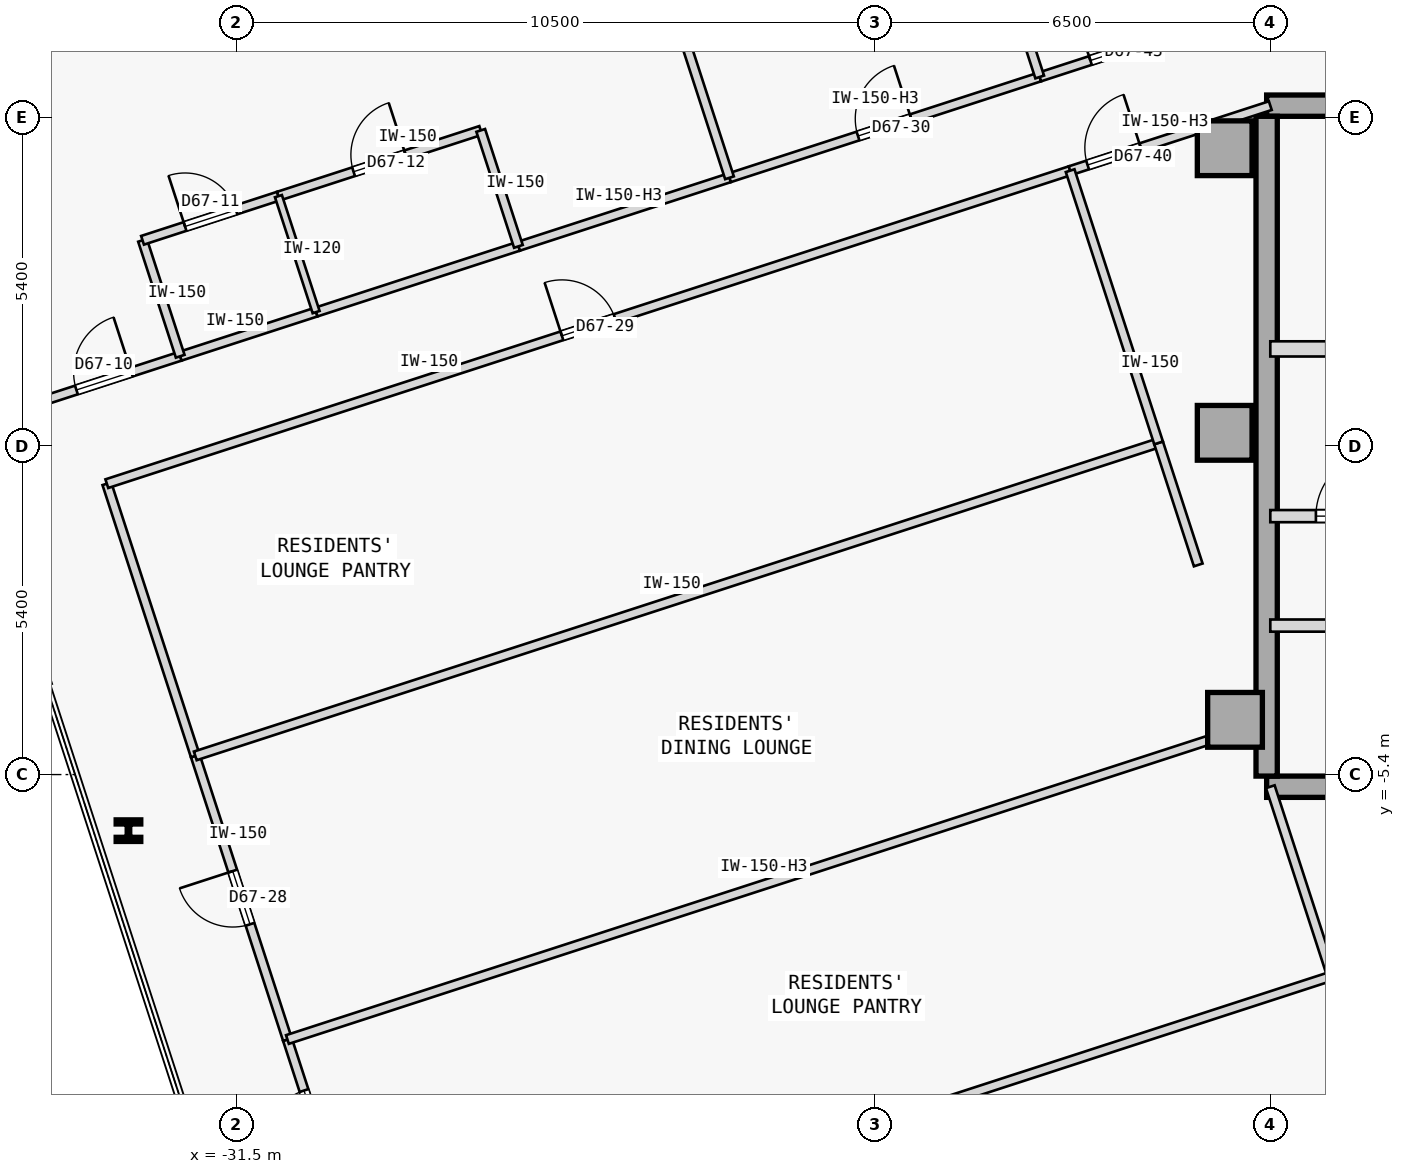
"""IFC4 building model, lengths in metres.
Left out: names, types, materials, properties, quantities, classifications, styles, units other than length and angle.
Written with IfcOpenShell. Run it as: python <this file> out.ifc"""

import sys

from ifc_helpers import new_model, si_unit, direction, frame, frame_2d, origin, origin_2d, place, context, subcontext, project, spatial, rectangle, i_section, extrude, element, fill, save


model = new_model("IFC4")
c1 = context("Model", 3, precision=1e-05, world=origin(), true_north=direction((0.0, 1.0)))
c2 = subcontext(c1, "Body", "Model", "MODEL_VIEW")
j1 = project(units=[si_unit("LENGTHUNIT", "METRE"), si_unit("PLANEANGLEUNIT", "RADIAN")], contexts=[c1])
p1 = place(None, origin())
s1 = spatial("IfcSite", under=j1, at=p1, CompositionType="ELEMENT")
p2 = place(p1, origin())
s2 = spatial("IfcBuilding", under=s1, at=p2, CompositionType="ELEMENT")
p3 = place(p2, frame((0.0, 0.0, 251.1)))
s3 = spatial("IfcBuildingStorey", under=s2, at=p3, CompositionType="ELEMENT", Elevation=251.1)
for number, where, z_axis, x_axis in (
    (1, (-15.25, 4.9, 0.0), (0.0, 0.0, 1.0), (1.0, 0.0, 0.0)),
    (2, (-15.25, 0.22, 0.0), (0.0, 0.0, 1.0), (1.0, 0.0, 0.0)),
    (3, (-15.08, -4.5, 0.0), (0.0, 0.0, 1.0), (1.0, 0.0, 0.0)),
):
    element("IfcColumn", number, at=place(p3, frame(where, z_axis=z_axis, x_axis=x_axis)), inside=s3, PredefinedType="COLUMN", context=c2, shape_type="SweptSolid", body=[
        extrude(rectangle(XDim=0.9, YDim=0.9, at=origin_2d()), origin(), (0.0, 0.0, 1.0), 3.35),
    ])
p4 = place(p3, frame((-14.56, 5.6, 0.0), z_axis=(0.0, 0.0, 1.0), x_axis=(1.0, 0.0, 0.0)))
e4 = element("IfcWall", 4, at=p4, inside=s3, PredefinedType="SHEAR", context=c2, shape_type="SweptSolid", body=[
    extrude(rectangle(XDim=11.41, YDim=0.35, at=frame_2d((5.705, 0.0))), origin(), (0.0, 0.0, 1.0), 2.95),
])
p5 = place(p3, frame((-14.56, -5.6, 0.0), z_axis=(0.0, 0.0, 1.0), x_axis=(1.0, 0.0, 0.0)))
e5 = element("IfcWall", 5, at=p5, inside=s3, PredefinedType="SHEAR", context=c2, shape_type="SweptSolid", body=[
    extrude(rectangle(XDim=10.86, YDim=0.35, at=frame_2d((5.43, 0.0))), origin(), (0.0, 0.0, 1.0), 2.95),
])
p6 = place(p3, frame((-14.56, -5.425, 0.0), z_axis=(0.0, 0.0, 1.0), x_axis=(0.0, 1.0, 0.0)))
e6 = element("IfcWall", 6, at=p6, inside=s3, PredefinedType="SHEAR", context=c2, shape_type="SweptSolid", body=[
    extrude(rectangle(XDim=10.85, YDim=0.35, at=frame_2d((5.425, 0.0))), origin(), (0.0, 0.0, 1.0), 2.95),
])
p7 = place(p3, frame((-33.278, -6.322, 0.0), z_axis=(0.0, 0.0, 1.0), x_axis=(1.0, 0.0, 0.0)))
e7 = element("IfcColumn", 7, at=p7, inside=s3, PredefinedType="COLUMN", context=c2, shape_type="SweptSolid", body=[
    extrude(i_section(OverallWidth=0.405, OverallDepth=0.355, WebThickness=0.042, FlangeThickness=0.068, FilletRadius=0.015, at=origin_2d()), origin(), (0.0, 0.0, 1.0), 3.35),
])
p8 = place(p3, frame((-14.5, 1.6, 0.0), z_axis=(0.0, 0.0, 1.0), x_axis=(1.0, 0.0, 0.0)))
e8 = element("IfcWall", 8, at=p8, inside=s3, PredefinedType="STANDARD", context=c2, shape_type="SweptSolid", body=[
    extrude(rectangle(XDim=3.6, YDim=0.25, at=frame_2d((1.8, 0.0))), origin(), (0.0, 0.0, 1.0), 2.95),
])
p9 = place(p8, frame((0.92, 0.0, 0.0)))
e9 = element("IfcOpeningElement", 9, at=p9, cuts=e8, PredefinedType="OPENING", context=c2, shape_type="SweptSolid", body=[
    extrude(rectangle(XDim=1.05, YDim=2.15, at=frame_2d((0.525, 1.075))), frame((0.0, 0.135, 0.0), z_axis=(0.0, -1.0, 0.0), x_axis=(1.0, 0.0, 0.0)), (0.0, 0.0, 1.0), 0.27),
])
p10 = place(p3, frame((-14.5, -1.15, 0.0), z_axis=(0.0, 0.0, 1.0), x_axis=(1.0, 0.0, 0.0)))
e10 = element("IfcWall", 10, at=p10, inside=s3, PredefinedType="STANDARD", context=c2, shape_type="SweptSolid", body=[
    extrude(rectangle(XDim=2.95, YDim=0.2, at=frame_2d((1.475, 0.0))), origin(), (0.0, 0.0, 1.0), 2.95),
])
p11 = place(p10, frame((0.75, 0.0, 0.0)))
e11 = element("IfcOpeningElement", 11, at=p11, cuts=e10, PredefinedType="OPENING", context=c2, shape_type="SweptSolid", body=[
    extrude(rectangle(XDim=1.05, YDim=2.18, at=frame_2d((0.525, 1.09))), frame((0.0, 0.11, 0.0), z_axis=(0.0, -1.0, 0.0), x_axis=(1.0, 0.0, 0.0)), (0.0, 0.0, 1.0), 0.22),
])
p12 = place(p3, frame((-14.5, -2.95, 0.0), z_axis=(0.0, 0.0, 1.0), x_axis=(1.0, 0.0, 0.0)))
e12 = element("IfcWall", 12, at=p12, inside=s3, PredefinedType="STANDARD", context=c2, shape_type="SweptSolid", body=[
    extrude(rectangle(XDim=10.8, YDim=0.2, at=frame_2d((5.4, 0.0))), origin(), (0.0, 0.0, 1.0), 2.95),
])
p13 = place(p12, frame((9.17, 0.0, 0.0)))
e13 = element("IfcOpeningElement", 13, at=p13, cuts=e12, PredefinedType="OPENING", context=c2, shape_type="SweptSolid", body=[
    extrude(rectangle(XDim=1.1, YDim=2.15, at=frame_2d((0.55, 1.075))), frame((0.0, 0.11, 0.0), z_axis=(0.0, -1.0, 0.0), x_axis=(1.0, 0.0, 0.0)), (0.0, 0.0, 1.0), 0.22),
])
p14 = place(p12, frame((3.86, 0.0, 0.0)))
e14 = element("IfcOpeningElement", 14, at=p14, cuts=e12, PredefinedType="OPENING", context=c2, shape_type="SweptSolid", body=[
    extrude(rectangle(XDim=0.92, YDim=2.15, at=frame_2d((0.46, 1.075))), frame((0.0, 0.11, 0.0), z_axis=(0.0, -1.0, 0.0), x_axis=(1.0, 0.0, 0.0)), (0.0, 0.0, 1.0), 0.22),
])
p15 = place(p3, frame((-36.012, 0.314, 0.0), z_axis=(0.0, 0.0, 1.0), x_axis=(0.951071182868, 0.308971851659, 0.0)))
e15 = element("IfcWall", 15, at=p15, inside=s3, PredefinedType="PARTITIONING", context=c2, shape_type="SweptSolid", body=[
    extrude(rectangle(XDim=3.77, YDim=0.15, at=frame_2d((1.885, 0.0))), origin(), (0.0, 0.0, 1.0), 2.95),
])
p16 = place(p15, frame((1.976, 0.0, 0.0)))
e16 = element("IfcOpeningElement", 16, at=p16, cuts=e15, PredefinedType="OPENING", context=c2, shape_type="SweptSolid", body=[
    extrude(rectangle(XDim=0.95, YDim=2.15, at=frame_2d((0.475, 1.075))), frame((0.0, 0.085, 0.0), z_axis=(0.0, -1.0, 0.0), x_axis=(1.0, 0.0, 0.0)), (0.0, 0.0, 1.0), 0.17),
])
p17 = place(p3, frame((-26.865, 3.286, 0.0), z_axis=(0.0, 0.0, 1.0), x_axis=(0.951057168147, 0.309014988174, 0.0)))
e17 = element("IfcWall", 17, at=p17, inside=s3, PredefinedType="PARTITIONING", context=c2, shape_type="SweptSolid", body=[
    extrude(rectangle(XDim=3.65, YDim=0.15, at=frame_2d((1.825, 0.0))), origin(), (0.0, 0.0, 1.0), 2.17),
])
p18 = place(p3, frame((-32.427, 1.479, 0.0), z_axis=(0.0, 0.0, 1.0), x_axis=(0.951045519245, 0.309050837767, 0.0)))
e18 = element("IfcWall", 18, at=p18, inside=s3, PredefinedType="PARTITIONING", context=c2, shape_type="SweptSolid", body=[
    extrude(rectangle(XDim=2.35, YDim=0.15, at=frame_2d((1.175, 0.0))), origin(), (0.0, 0.0, 1.0), 2.95),
])
p19 = place(p3, frame((-30.192, 2.205, 0.0), z_axis=(0.0, 0.0, 1.0), x_axis=(0.951063814176, 0.308994532905, 0.0)))
e19 = element("IfcWall", 19, at=p19, inside=s3, PredefinedType="PARTITIONING", context=c2, shape_type="SweptSolid", body=[
    extrude(rectangle(XDim=3.498, YDim=0.15, at=frame_2d((1.749, 0.0))), origin(), (0.0, 0.0, 1.0), 2.95),
])
p20 = place(p3, frame((-29.833, -12.311, 0.0), z_axis=(0.0, 0.0, 1.0), x_axis=(-0.309044953986, 0.951047431213, 0.0)))
e20 = element("IfcWall", 20, at=p20, inside=s3, PredefinedType="PARTITIONING", context=c2, shape_type="SweptSolid", body=[
    extrude(rectangle(XDim=2.685, YDim=0.15, at=frame_2d((1.343, 0.0))), origin(), (0.0, 0.0, 1.0), 2.95),
])
p21 = place(p20, frame((0.883, 0.0, 0.0)))
e21 = element("IfcOpeningElement", 21, at=p21, cuts=e20, PredefinedType="OPENING", context=c2, shape_type="SweptSolid", body=[
    extrude(rectangle(XDim=0.92, YDim=2.15, at=frame_2d((0.46, 1.075))), frame((0.0, 0.085, 0.0), z_axis=(0.0, -1.0, 0.0), x_axis=(1.0, 0.0, 0.0)), (0.0, 0.0, 1.0), 0.17),
])
p22 = place(p3, frame((-30.663, -9.757, 0.0), z_axis=(0.0, 0.0, 1.0), x_axis=(-0.309019653166, 0.951055652397, 0.0)))
e22 = element("IfcWall", 22, at=p22, inside=s3, PredefinedType="PARTITIONING", context=c2, shape_type="SweptSolid", body=[
    extrude(rectangle(XDim=4.904, YDim=0.15, at=frame_2d((2.452, 0.0))), origin(), (0.0, 0.0, 1.0), 2.95),
])
p23 = place(p22, frame((1.992, 0.0, 0.0)))
e23 = element("IfcOpeningElement", 23, at=p23, cuts=e22, PredefinedType="OPENING", context=c2, shape_type="SweptSolid", body=[
    extrude(rectangle(XDim=0.92, YDim=2.15, at=frame_2d((0.46, 1.075))), frame((0.0, 0.085, 0.0), z_axis=(0.0, -1.0, 0.0), x_axis=(1.0, 0.0, 0.0)), (0.0, 0.0, 1.0), 0.17),
])
p24 = place(p3, frame((-32.179, -5.093, 0.0), z_axis=(0.0, 0.0, 1.0), x_axis=(-0.309014532869, 0.951057316083, 0.0)))
e24 = element("IfcWall", 24, at=p24, inside=s3, PredefinedType="PARTITIONING", context=c2, shape_type="SweptSolid", body=[
    extrude(rectangle(XDim=4.707, YDim=0.15, at=frame_2d((2.354, 0.0))), origin(), (0.0, 0.0, 1.0), 2.95),
])
p25 = place(p3, frame((-33.633, -0.616, 0.0), z_axis=(0.0, 0.0, 1.0), x_axis=(0.951058192995, 0.309011833974, 0.0)))
e25 = element("IfcWall", 25, at=p25, inside=s3, PredefinedType="PARTITIONING", context=c2, shape_type="SweptSolid", body=[
    extrude(rectangle(XDim=16.657, YDim=0.15, at=frame_2d((8.329, 0.0))), origin(), (0.0, 0.0, 1.0), 2.95),
])
p26 = place(p25, frame((7.868, 0.0, 0.0)))
e26 = element("IfcOpeningElement", 26, at=p26, cuts=e25, PredefinedType="OPENING", context=c2, shape_type="SweptSolid", body=[
    extrude(rectangle(XDim=0.92, YDim=2.15, at=frame_2d((0.46, 1.075))), frame((0.0, 0.085, 0.0), z_axis=(0.0, -1.0, 0.0), x_axis=(1.0, 0.0, 0.0)), (0.0, 0.0, 1.0), 0.17),
])
p27 = place(p3, frame((-23.394, 4.414, 0.0), z_axis=(0.0, 0.0, 1.0), x_axis=(0.951050121956, 0.309036673434, 0.0)))
e27 = element("IfcWall", 27, at=p27, inside=s3, PredefinedType="PARTITIONING", context=c2, shape_type="SweptSolid", body=[
    extrude(rectangle(XDim=5.364, YDim=0.15, at=frame_2d((2.682, 0.0))), origin(), (0.0, 0.0, 1.0), 2.17),
])
p28 = place(p27, frame((2.222, 0.0, 0.0)))
e28 = element("IfcOpeningElement", 28, at=p28, cuts=e27, PredefinedType="OPENING", context=c2, shape_type="SweptSolid", body=[
    extrude(rectangle(XDim=0.92, YDim=2.15, at=frame_2d((0.46, 1.075))), frame((0.0, 0.085, 0.0), z_axis=(0.0, -1.0, 0.0), x_axis=(1.0, 0.0, 0.0)), (0.0, 0.0, 1.0), 0.17),
])
p29 = place(p3, frame((-17.792, 4.531, 0.0), z_axis=(0.0, 0.0, 1.0), x_axis=(0.951047546178, 0.309044600193, 0.0)))
e29 = element("IfcWall", 29, at=p29, inside=s3, PredefinedType="PARTITIONING", context=c2, shape_type="SweptSolid", body=[
    extrude(rectangle(XDim=3.461, YDim=0.15, at=frame_2d((1.73, 0.0))), origin(), (0.0, 0.0, 1.0), 2.17),
])
p30 = place(p29, frame((0.302, 0.0, 0.0)))
e30 = element("IfcOpeningElement", 30, at=p30, cuts=e29, PredefinedType="OPENING", context=c2, shape_type="SweptSolid", body=[
    extrude(rectangle(XDim=0.92, YDim=2.15, at=frame_2d((0.46, 1.075))), frame((0.0, 0.085, 0.0), z_axis=(0.0, -1.0, 0.0), x_axis=(1.0, 0.0, 0.0)), (0.0, 0.0, 1.0), 0.17),
])
p31 = place(p3, frame((-18.292, 6.072, 0.0), z_axis=(0.0, 0.0, 1.0), x_axis=(0.951062707515, 0.30899793911, 0.0)))
e31 = element("IfcWall", 31, at=p31, inside=s3, PredefinedType="PARTITIONING", context=c2, shape_type="SweptSolid", body=[
    extrude(rectangle(XDim=6.076, YDim=0.15, at=frame_2d((3.038, 0.0))), origin(), (0.0, 0.0, 1.0), 2.95),
])
p32 = place(p31, frame((0.877, 0.0, 0.0)))
e32 = element("IfcOpeningElement", 32, at=p32, cuts=e31, PredefinedType="OPENING", context=c2, shape_type="SweptSolid", body=[
    extrude(rectangle(XDim=0.92, YDim=2.15, at=frame_2d((0.46, 1.075))), frame((0.0, 0.085, 0.0), z_axis=(0.0, -1.0, 0.0), x_axis=(1.0, 0.0, 0.0)), (0.0, 0.0, 1.0), 0.17),
])
p33 = place(p3, frame((-32.427, 1.479, 0.0), z_axis=(0.0, 0.0, 1.0), x_axis=(-0.309022749039, 0.951054646472, 0.0)))
e33 = element("IfcWall", 33, at=p33, inside=s3, PredefinedType="PARTITIONING", context=c2, shape_type="SweptSolid", body=[
    extrude(rectangle(XDim=2.005, YDim=0.15, at=frame_2d((1.002, 0.0))), origin(), (0.0, 0.0, 1.0), 2.95),
])
p34 = place(p3, frame((-33.046, 3.386, 0.0), z_axis=(0.0, 0.0, 1.0), x_axis=(0.951045519245, 0.309050837767, 0.0)))
e34 = element("IfcWall", 34, at=p34, inside=s3, PredefinedType="PARTITIONING", context=c2, shape_type="SweptSolid", body=[
    extrude(rectangle(XDim=2.35, YDim=0.15, at=frame_2d((1.175, 0.0))), origin(), (0.0, 0.0, 1.0), 2.95),
])
p35 = place(p34, frame((0.735, 0.0, 0.0)))
e35 = element("IfcOpeningElement", 35, at=p35, cuts=e34, PredefinedType="OPENING", context=c2, shape_type="SweptSolid", body=[
    extrude(rectangle(XDim=0.88, YDim=2.15, at=frame_2d((0.44, 1.075))), frame((0.0, 0.085, 0.0), z_axis=(0.0, -1.0, 0.0), x_axis=(1.0, 0.0, 0.0)), (0.0, 0.0, 1.0), 0.17),
])
p36 = place(p3, frame((-30.811, 4.112, 0.0), z_axis=(0.0, 0.0, 1.0), x_axis=(0.951063814176, 0.308994532905, 0.0)))
e36 = element("IfcWall", 36, at=p36, inside=s3, PredefinedType="PARTITIONING", context=c2, shape_type="SweptSolid", body=[
    extrude(rectangle(XDim=3.498, YDim=0.15, at=frame_2d((1.749, 0.0))), origin(), (0.0, 0.0, 1.0), 2.95),
])
p37 = place(p36, frame((1.299, 0.0, 0.0)))
e37 = element("IfcOpeningElement", 37, at=p37, cuts=e36, PredefinedType="OPENING", context=c2, shape_type="SweptSolid", body=[
    extrude(rectangle(XDim=0.9, YDim=2.15, at=frame_2d((0.45, 1.075))), frame((0.0, 0.085, 0.0), z_axis=(0.0, -1.0, 0.0), x_axis=(1.0, 0.0, 0.0)), (0.0, 0.0, 1.0), 0.17),
])
p38 = place(p3, frame((-26.865, 3.286, 0.0), z_axis=(0.0, 0.0, 1.0), x_axis=(-0.309022749039, 0.951054646472, 0.0)))
e38 = element("IfcWall", 38, at=p38, inside=s3, PredefinedType="PARTITIONING", context=c2, shape_type="SweptSolid", body=[
    extrude(rectangle(XDim=2.005, YDim=0.15, at=frame_2d((1.002, 0.0))), origin(), (0.0, 0.0, 1.0), 2.95),
])
p39 = place(p3, frame((-23.394, 4.414, 0.0), z_axis=(0.0, 0.0, 1.0), x_axis=(-0.308976906612, 0.951069540665, 0.0)))
e39 = element("IfcWall", 39, at=p39, inside=s3, PredefinedType="PARTITIONING", context=c2, shape_type="SweptSolid", body=[
    extrude(rectangle(XDim=2.579, YDim=0.15, at=frame_2d((1.29, 0.0))), origin(), (0.0, 0.0, 1.0), 2.95),
])
p40 = place(p3, frame((-30.192, 2.205, 0.0), z_axis=(0.0, 0.0, 1.0), x_axis=(-0.309022749039, 0.951054646472, 0.0)))
e40 = element("IfcWall", 40, at=p40, inside=s3, PredefinedType="PARTITIONING", context=c2, shape_type="SweptSolid", body=[
    extrude(rectangle(XDim=2.005, YDim=0.12, at=frame_2d((1.002, 0.0))), origin(), (0.0, 0.0, 1.0), 2.95),
])
p41 = place(p3, frame((-31.208, -14.471, 0.0), z_axis=(0.0, 0.0, 1.0), x_axis=(0.951057753948, 0.309013185244, 0.0)))
e41 = element("IfcWall", 41, at=p41, inside=s3, PredefinedType="PARTITIONING", context=c2, shape_type="SweptSolid", body=[
    extrude(rectangle(XDim=18.632, YDim=0.15, at=frame_2d((9.316, 0.0))), origin(), (0.0, 0.0, 1.0), 2.95),
])
p42 = place(p3, frame((-30.663, -9.757, 0.0), z_axis=(0.0, 0.0, 1.0), x_axis=(0.951058192995, 0.309011833974, 0.0)))
e42 = element("IfcWall", 42, at=p42, inside=s3, PredefinedType="PARTITIONING", context=c2, shape_type="SweptSolid", body=[
    extrude(rectangle(XDim=16.657, YDim=0.15, at=frame_2d((8.329, 0.0))), origin(), (0.0, 0.0, 1.0), 2.17),
])
p43 = place(p3, frame((-13.488, -8.713, 0.0), z_axis=(0.0, 0.0, 1.0), x_axis=(-0.309082700143, 0.951035164687, 0.0)))
e43 = element("IfcWall", 43, at=p43, inside=s3, PredefinedType="PARTITIONING", context=c2, shape_type="SweptSolid", body=[
    extrude(rectangle(XDim=3.274, YDim=0.15, at=frame_2d((1.637, 0.0))), origin(), (0.0, 0.0, 1.0), 2.95),
])
p44 = place(p3, frame((-32.179, -5.093, 0.0), z_axis=(0.0, 0.0, 1.0), x_axis=(0.951053885426, 0.309025091239, 0.0)))
e44 = element("IfcWall", 44, at=p44, inside=s3, PredefinedType="PARTITIONING", context=c2, shape_type="SweptSolid", body=[
    extrude(rectangle(XDim=16.657, YDim=0.15, at=frame_2d((8.329, 0.0))), origin(), (0.0, 0.0, 1.0), 2.95),
])
p45 = place(p3, frame((-15.685, -1.952, 0.0), z_axis=(0.0, 0.0, 1.0), x_axis=(-0.308929092959, 0.951085072706, 0.0)))
e45 = element("IfcWall", 45, at=p45, inside=s3, PredefinedType="PARTITIONING", context=c2, shape_type="SweptSolid", body=[
    extrude(rectangle(XDim=2.11, YDim=0.15, at=frame_2d((1.055, 0.0))), origin(), (0.0, 0.0, 1.0), 2.95),
])
p46 = place(p3, frame((-16.337, 0.054, 0.0), z_axis=(0.0, 0.0, 1.0), x_axis=(-0.309029776355, 0.951052363083, 0.0)))
e46 = element("IfcWall", 46, at=p46, inside=s3, PredefinedType="PARTITIONING", context=c2, shape_type="SweptSolid", body=[
    extrude(rectangle(XDim=4.707, YDim=0.15, at=frame_2d((2.354, 0.0))), origin(), (0.0, 0.0, 1.0), 2.95),
])
p47 = place(p3, frame((-18.292, 6.072, 0.0), z_axis=(0.0, 0.0, 1.0), x_axis=(-0.309090353524, 0.951032677335, 0.0)))
e47 = element("IfcWall", 47, at=p47, inside=s3, PredefinedType="PARTITIONING", context=c2, shape_type="SweptSolid", body=[
    extrude(rectangle(XDim=2.579, YDim=0.15, at=frame_2d((1.29, 0.0))), origin(), (0.0, 0.0, 1.0), 2.95),
])
p48 = place(p11, origin())
e48 = element("IfcDoor", 48, at=p48, inside=s3, OperationType="SINGLE_SWING_RIGHT", PredefinedType="DOOR", context=c2, shape_type="SweptSolid", body=[
    extrude(rectangle(XDim=1.05, YDim=2.18, at=frame_2d((0.525, 1.09))), frame((0.0, 0.025, 0.0), z_axis=(0.0, -1.0, 0.0), x_axis=(1.0, 0.0, 0.0)), (0.0, 0.0, 1.0), 0.05),
])
fill(e11, e48)
p49 = place(p16, origin())
e49 = element("IfcDoor", 49, at=p49, inside=s3, OperationType="SINGLE_SWING_RIGHT", PredefinedType="DOOR", context=c2, shape_type="SweptSolid", body=[
    extrude(rectangle(XDim=0.95, YDim=2.15, at=frame_2d((0.475, 1.075))), frame((0.0, 0.025, 0.0), z_axis=(0.0, -1.0, 0.0), x_axis=(1.0, 0.0, 0.0)), (0.0, 0.0, 1.0), 0.05),
])
fill(e16, e49)
p50 = place(p35, origin())
e50 = element("IfcDoor", 50, at=p50, inside=s3, OperationType="SINGLE_SWING_LEFT", PredefinedType="DOOR", context=c2, shape_type="SweptSolid", body=[
    extrude(rectangle(XDim=0.88, YDim=2.15, at=frame_2d((0.44, 1.075))), frame((0.0, 0.025, 0.0), z_axis=(0.0, -1.0, 0.0), x_axis=(1.0, 0.0, 0.0)), (0.0, 0.0, 1.0), 0.05),
])
fill(e35, e50)
p51 = place(p37, origin())
e51 = element("IfcDoor", 51, at=p51, inside=s3, OperationType="SINGLE_SWING_RIGHT", PredefinedType="DOOR", context=c2, shape_type="SweptSolid", body=[
    extrude(rectangle(XDim=0.9, YDim=2.15, at=frame_2d((0.45, 1.075))), frame((0.0, 0.025, 0.0), z_axis=(0.0, -1.0, 0.0), x_axis=(1.0, 0.0, 0.0)), (0.0, 0.0, 1.0), 0.05),
])
fill(e37, e51)
p52 = place(p21, origin())
e52 = element("IfcDoor", 52, at=p52, inside=s3, OperationType="SINGLE_SWING_LEFT", PredefinedType="DOOR", context=c2, shape_type="SweptSolid", body=[
    extrude(rectangle(XDim=0.92, YDim=2.15, at=frame_2d((0.46, 1.075))), frame((0.0, 0.025, 0.0), z_axis=(0.0, -1.0, 0.0), x_axis=(1.0, 0.0, 0.0)), (0.0, 0.0, 1.0), 0.05),
])
fill(e21, e52)
p53 = place(p23, origin())
e53 = element("IfcDoor", 53, at=p53, inside=s3, OperationType="SINGLE_SWING_RIGHT", PredefinedType="DOOR", context=c2, shape_type="SweptSolid", body=[
    extrude(rectangle(XDim=0.92, YDim=2.15, at=frame_2d((0.46, 1.075))), frame((0.0, 0.025, 0.0), z_axis=(0.0, -1.0, 0.0), x_axis=(1.0, 0.0, 0.0)), (0.0, 0.0, 1.0), 0.05),
])
fill(e23, e53)
p54 = place(p26, origin())
e54 = element("IfcDoor", 54, at=p54, inside=s3, OperationType="SINGLE_SWING_LEFT", PredefinedType="DOOR", context=c2, shape_type="SweptSolid", body=[
    extrude(rectangle(XDim=0.92, YDim=2.15, at=frame_2d((0.46, 1.075))), frame((0.0, 0.025, 0.0), z_axis=(0.0, -1.0, 0.0), x_axis=(1.0, 0.0, 0.0)), (0.0, 0.0, 1.0), 0.05),
])
fill(e26, e54)
p55 = place(p28, origin())
e55 = element("IfcDoor", 55, at=p55, inside=s3, OperationType="SINGLE_SWING_RIGHT", PredefinedType="DOOR", context=c2, shape_type="SweptSolid", body=[
    extrude(rectangle(XDim=0.92, YDim=2.15, at=frame_2d((0.46, 1.075))), frame((0.0, 0.025, 0.0), z_axis=(0.0, -1.0, 0.0), x_axis=(1.0, 0.0, 0.0)), (0.0, 0.0, 1.0), 0.05),
])
fill(e28, e55)
p56 = place(p30, origin())
e56 = element("IfcDoor", 56, at=p56, inside=s3, OperationType="SINGLE_SWING_RIGHT", PredefinedType="DOOR", context=c2, shape_type="SweptSolid", body=[
    extrude(rectangle(XDim=0.92, YDim=2.15, at=frame_2d((0.46, 1.075))), frame((0.0, 0.025, 0.0), z_axis=(0.0, -1.0, 0.0), x_axis=(1.0, 0.0, 0.0)), (0.0, 0.0, 1.0), 0.05),
])
fill(e30, e56)
p57 = place(p32, origin())
e57 = element("IfcDoor", 57, at=p57, inside=s3, OperationType="SINGLE_SWING_LEFT", PredefinedType="DOOR", context=c2, shape_type="SweptSolid", body=[
    extrude(rectangle(XDim=0.92, YDim=2.15, at=frame_2d((0.46, 1.075))), frame((0.0, 0.025, 0.0), z_axis=(0.0, -1.0, 0.0), x_axis=(1.0, 0.0, 0.0)), (0.0, 0.0, 1.0), 0.05),
])
fill(e32, e57)
save(model, sys.argv[1])
